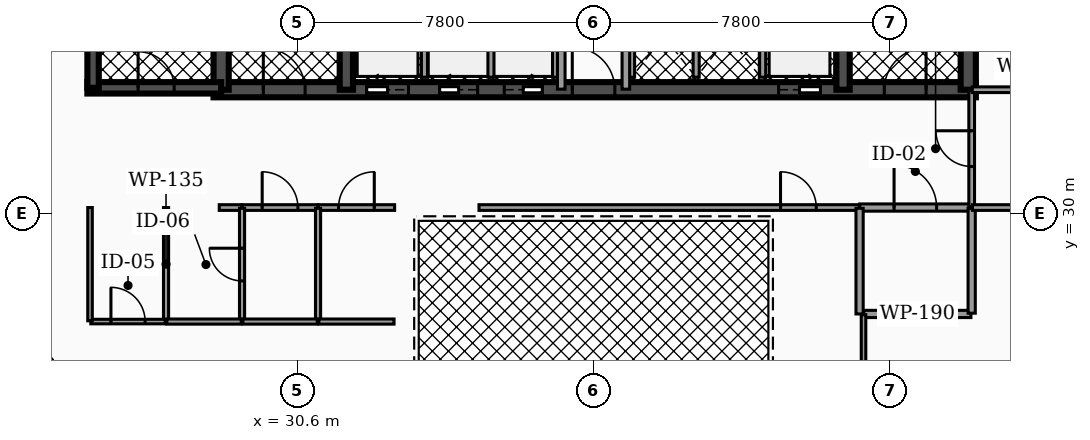
"""IFC4 building model, lengths in metres.
Left out: names, types, materials, properties, quantities, classifications, styles, units other than length and angle.
Written with IfcOpenShell. Run it as: python <this file> out.ifc"""

import sys

from ifc_helpers import new_model, si_unit, direction, frame, frame_2d, origin, place, context, subcontext, project, spatial, rectangle, extrude, element, fill, save


model = new_model("IFC4")
c1 = context("Model", 3, precision=1e-05, world=origin(), true_north=direction((0.0, 1.0)))
c2 = subcontext(c1, "Body", "Model", "MODEL_VIEW")
j1 = project(units=[si_unit("LENGTHUNIT", "METRE"), si_unit("PLANEANGLEUNIT", "RADIAN")], contexts=[c1])
p1 = place(None, origin())
s1 = spatial("IfcSite", under=j1, at=p1, CompositionType="ELEMENT")
p2 = place(p1, origin())
s2 = spatial("IfcBuilding", under=s1, at=p2, CompositionType="ELEMENT")
p3 = place(p2, frame((0.0, 0.0, 160.82)))
s3 = spatial("IfcBuildingStorey", under=s2, at=p3, CompositionType="ELEMENT", Elevation=160.82)
p4 = place(p3, frame((28.4, 33.25, 0.0), z_axis=(0.0, 0.0, 1.0), x_axis=(1.0, 0.0, 0.0)))
e1 = element("IfcWall", 1, at=p4, inside=s3, PredefinedType="SHEAR", context=c2, shape_type="SweptSolid", body=[
    extrude(rectangle(XDim=20.06, YDim=0.4, at=frame_2d((10.03, 0.0))), origin(), (0.0, 0.0, 1.0), 3.5),
])
p5 = place(p4, frame((4.03, 0.0, 0.0)))
e2 = element("IfcOpeningElement", 2, at=p5, cuts=e1, PredefinedType="OPENING", context=c2, shape_type="SweptSolid", body=[
    extrude(rectangle(XDim=1.1, YDim=2.15, at=frame_2d((0.55, 1.075))), frame((0.0, 0.21, 0.0), z_axis=(0.0, -1.0, 0.0), x_axis=(1.0, 0.0, 0.0)), (0.0, 0.0, 1.0), 0.42),
])
p6 = place(p4, frame((14.87, 0.0, 0.0)))
e3 = element("IfcOpeningElement", 3, at=p6, cuts=e1, PredefinedType="OPENING", context=c2, shape_type="SweptSolid", body=[
    extrude(rectangle(XDim=1.1, YDim=2.15, at=frame_2d((0.55, 1.075))), frame((0.0, 0.21, 0.0), z_axis=(0.0, -1.0, 0.0), x_axis=(1.0, 0.0, 0.0)), (0.0, 0.0, 1.0), 0.42),
])
p7 = place(p4, frame((5.95, 0.0, 0.0)))
e4 = element("IfcOpeningElement", 4, at=p7, cuts=e1, PredefinedType="OPENING", context=c2, shape_type="SweptSolid", body=[
    extrude(rectangle(XDim=1.0, YDim=2.1, at=frame_2d((0.5, 1.05))), frame((0.0, 0.21, 0.0), z_axis=(0.0, -1.0, 0.0), x_axis=(1.0, 0.0, 0.0)), (0.0, 0.0, 1.0), 0.42),
])
p8 = place(p4, frame((7.65, 0.0, 0.0)))
e5 = element("IfcOpeningElement", 5, at=p8, cuts=e1, PredefinedType="OPENING", context=c2, shape_type="SweptSolid", body=[
    extrude(rectangle(XDim=1.0, YDim=2.1, at=frame_2d((0.5, 1.05))), frame((0.0, 0.21, 0.0), z_axis=(0.0, -1.0, 0.0), x_axis=(1.0, 0.0, 0.0)), (0.0, 0.0, 1.0), 0.42),
])
p9 = place(p4, frame((1.31, 0.0, 0.0)))
e6 = element("IfcOpeningElement", 6, at=p9, cuts=e1, PredefinedType="OPENING", context=c2, shape_type="SweptSolid", body=[
    extrude(rectangle(XDim=1.1, YDim=2.2, at=frame_2d((0.55, 1.1))), frame((0.0, 0.21, 0.0), z_axis=(0.0, -1.0, 0.0), x_axis=(1.0, 0.0, 0.0)), (0.0, 0.0, 1.0), 0.42),
])
p10 = place(p4, frame((9.44, 0.0, 0.0)))
e7 = element("IfcOpeningElement", 7, at=p10, cuts=e1, PredefinedType="OPENING", context=c2, shape_type="SweptSolid", body=[
    extrude(rectangle(XDim=1.12, YDim=2.05, at=frame_2d((0.56, 1.025))), frame((0.0, 0.21, 0.0), z_axis=(0.0, -1.0, 0.0), x_axis=(1.0, 0.0, 0.0)), (0.0, 0.0, 1.0), 0.42),
])
p11 = place(p4, frame((17.65, 0.0, 0.0)))
e8 = element("IfcOpeningElement", 8, at=p11, cuts=e1, PredefinedType="OPENING", context=c2, shape_type="SweptSolid", body=[
    extrude(rectangle(XDim=1.1, YDim=2.2, at=frame_2d((0.55, 1.1))), frame((0.0, 0.21, 0.0), z_axis=(0.0, -1.0, 0.0), x_axis=(1.0, 0.0, 0.0)), (0.0, 0.0, 1.0), 0.42),
])
p12 = place(p3, frame((28.6, 33.25, 0.0), z_axis=(0.0, 0.0, 1.0), x_axis=(0.0, 1.0, 0.0)))
e9 = element("IfcWall", 9, at=p12, inside=s3, PredefinedType="SHEAR", context=c2, shape_type="SweptSolid", body=[
    extrude(rectangle(XDim=10.2, YDim=0.4, at=frame_2d((5.1, 0.0))), origin(), (0.0, 0.0, 1.0), 3.5),
])
for number, where, z_axis, x_axis in (
    (10, (31.895, 33.25, 0.0), (0.0, 0.0, 1.0), (0.0, 1.0, 0.0)),
    (11, (44.965, 33.25, 0.0), (0.0, 0.0, 1.0), (0.0, 1.0, 0.0)),
):
    element("IfcWall", number, at=place(p3, frame(where, z_axis=z_axis, x_axis=x_axis)), inside=s3, PredefinedType="SHEAR", context=c2, shape_type="SweptSolid", body=[
        extrude(rectangle(XDim=10.2, YDim=0.35, at=frame_2d((5.1, 0.0))), origin(), (0.0, 0.0, 1.0), 3.5),
    ])
p13 = place(p3, frame((48.26, 33.25, 0.0), z_axis=(0.0, 0.0, 1.0), x_axis=(0.0, 1.0, 0.0)))
e12 = element("IfcWall", 12, at=p13, inside=s3, PredefinedType="SHEAR", context=c2, shape_type="SweptSolid", body=[
    extrude(rectangle(XDim=10.2, YDim=0.4, at=frame_2d((5.1, 0.0))), origin(), (0.0, 0.0, 1.0), 3.5),
])
p14 = place(p3, frame((25.08, 33.3, 0.0), z_axis=(0.0, 0.0, 1.0), x_axis=(1.0, 0.0, 0.0)))
e13 = element("IfcWall", 13, at=p14, inside=s3, PredefinedType="SHEAR", context=c2, shape_type="SweptSolid", body=[
    extrude(rectangle(XDim=3.52, YDim=0.3, at=frame_2d((1.76, 0.0))), origin(), (0.0, 0.0, 1.0), 3.5),
])
p15 = place(p14, frame((1.335, 0.0, 0.0)))
e14 = element("IfcOpeningElement", 14, at=p15, cuts=e13, PredefinedType="OPENING", context=c2, shape_type="SweptSolid", body=[
    extrude(rectangle(XDim=0.95, YDim=2.2, at=frame_2d((0.475, 1.1))), frame((0.0, 0.16, 0.0), z_axis=(0.0, -1.0, 0.0), x_axis=(1.0, 0.0, 0.0)), (0.0, 0.0, 1.0), 0.32),
])
p16 = place(p3, frame((25.23, 33.3, 0.0), z_axis=(0.0, 0.0, 1.0), x_axis=(0.0, 1.0, 0.0)))
e15 = element("IfcWall", 15, at=p16, inside=s3, PredefinedType="SHEAR", context=c2, shape_type="SweptSolid", body=[
    extrude(rectangle(XDim=7.6, YDim=0.3, at=frame_2d((3.8, 0.0))), origin(), (0.0, 0.0, 1.0), 3.5),
])
for number, where, z_axis, x_axis in (
    (16, (33.95, 33.58, 0.0), (0.0, 0.0, 1.0), (0.0, 1.0, 0.0)),
    (17, (42.85, 33.58, 0.0), (0.0, 0.0, 1.0), (0.0, 1.0, 0.0)),
):
    element("IfcWall", number, at=place(p3, frame(where, z_axis=z_axis, x_axis=x_axis)), inside=s3, PredefinedType="SOLIDWALL", context=c2, shape_type="SweptSolid", body=[
        extrude(rectangle(XDim=2.45, YDim=0.16, at=frame_2d((1.225, 0.0))), origin(), (0.0, 0.0, 1.0), 2.472),
    ])
for number, where, z_axis, x_axis in (
    (18, (35.7, 33.58, 0.0), (0.0, 0.0, 1.0), (0.0, 1.0, 0.0)),
    (19, (37.4, 33.58, 0.0), (0.0, 0.0, 1.0), (0.0, 1.0, 0.0)),
    (20, (39.4, 33.58, 0.0), (0.0, 0.0, 1.0), (0.0, 1.0, 0.0)),
    (21, (41.1, 33.58, 0.0), (0.0, 0.0, 1.0), (0.0, 1.0, 0.0)),
):
    element("IfcWall", number, at=place(p3, frame(where, z_axis=z_axis, x_axis=x_axis)), inside=s3, PredefinedType="SOLIDWALL", context=c2, shape_type="SweptSolid", body=[
        extrude(rectangle(XDim=2.25, YDim=0.16, at=frame_2d((1.125, 0.0))), origin(), (0.0, 0.0, 1.0), 2.472),
    ])
p17 = place(p3, frame((37.55, 33.265, 0.0), z_axis=(0.0, 0.0, 1.0), x_axis=(0.0, 1.0, 0.0)))
e22 = element("IfcWall", 22, at=p17, inside=s3, PredefinedType="PARTITIONING", context=c2, shape_type="SweptSolid", body=[
    extrude(rectangle(XDim=4.595, YDim=0.2, at=frame_2d((2.298, 0.0))), origin(), (0.0, 0.0, 1.0), 2.457),
])
p18 = place(p17, frame((3.058, 0.0, 0.0)))
e23 = element("IfcOpeningElement", 23, at=p18, cuts=e22, PredefinedType="OPENING", context=c2, shape_type="SweptSolid", body=[
    extrude(rectangle(XDim=0.88, YDim=2.05, at=frame_2d((0.44, 1.025))), frame((0.0, 0.11, 0.0), z_axis=(0.0, -1.0, 0.0), x_axis=(1.0, 0.0, 0.0)), (0.0, 0.0, 1.0), 0.22),
])
p19 = place(p3, frame((39.25, 33.265, 0.0), z_axis=(0.0, 0.0, 1.0), x_axis=(0.0, 1.0, 0.0)))
e24 = element("IfcWall", 24, at=p19, inside=s3, PredefinedType="PARTITIONING", context=c2, shape_type="SweptSolid", body=[
    extrude(rectangle(XDim=4.595, YDim=0.2, at=frame_2d((2.298, 0.0))), origin(), (0.0, 0.0, 1.0), 2.457),
])
p20 = place(p19, frame((3.058, 0.0, 0.0)))
e25 = element("IfcOpeningElement", 25, at=p20, cuts=e24, PredefinedType="OPENING", context=c2, shape_type="SweptSolid", body=[
    extrude(rectangle(XDim=0.88, YDim=2.05, at=frame_2d((0.44, 1.025))), frame((0.0, 0.11, 0.0), z_axis=(0.0, -1.0, 0.0), x_axis=(1.0, 0.0, 0.0)), (0.0, 0.0, 1.0), 0.22),
])
p21 = place(p3, frame((45.405, 30.15, 0.0), z_axis=(0.0, 0.0, 1.0), x_axis=(1.0, 0.0, 0.0)))
e26 = element("IfcWall", 26, at=p21, inside=s3, PredefinedType="PARTITIONING", context=c2, shape_type="SweptSolid", body=[
    extrude(rectangle(XDim=2.925, YDim=0.19, at=frame_2d((1.462, 0.0))), origin(), (0.0, 0.0, 1.0), 2.457),
])
p22 = place(p21, frame((0.903, 0.0, 0.0)))
e27 = element("IfcOpeningElement", 27, at=p22, cuts=e26, PredefinedType="OPENING", context=c2, shape_type="SweptSolid", body=[
    extrude(rectangle(XDim=1.12, YDim=2.05, at=frame_2d((0.56, 1.025))), frame((0.0, 0.105, 0.0), z_axis=(0.0, -1.0, 0.0), x_axis=(1.0, 0.0, 0.0)), (0.0, 0.0, 1.0), 0.21),
])
p23 = place(p3, frame((48.35, 30.17, 0.0), z_axis=(0.0, 0.0, 1.0), x_axis=(0.0, 1.0, 0.0)))
e28 = element("IfcWall", 28, at=p23, inside=s3, PredefinedType="PARTITIONING", context=c2, shape_type="SweptSolid", body=[
    extrude(rectangle(XDim=3.06, YDim=0.15, at=frame_2d((1.53, 0.0))), origin(), (0.0, 0.0, 1.0), 2.457),
])
p24 = place(p23, frame((1.06, 0.0, 0.0)))
e29 = element("IfcOpeningElement", 29, at=p24, cuts=e28, PredefinedType="OPENING", context=c2, shape_type="SweptSolid", body=[
    extrude(rectangle(XDim=0.94, YDim=2.05, at=frame_2d((0.47, 1.025))), frame((0.0, 0.085, 0.0), z_axis=(0.0, -1.0, 0.0), x_axis=(1.0, 0.0, 0.0)), (0.0, 0.0, 1.0), 0.17),
])
p25 = place(p3, frame((28.55, 30.15, 0.0), z_axis=(0.0, 0.0, 1.0), x_axis=(1.0, 0.0, 0.0)))
e30 = element("IfcWall", 30, at=p25, inside=s3, PredefinedType="PARTITIONING", context=c2, shape_type="SweptSolid", body=[
    extrude(rectangle(XDim=0.595, YDim=0.15, at=frame_2d((0.297, 0.0))), origin(), (0.0, 0.0, 1.0), 2.457),
])
p26 = place(p3, frame((29.155, 30.15, 0.0), z_axis=(0.0, 0.0, 1.0), x_axis=(1.0, 0.0, 0.0)))
e31 = element("IfcWall", 31, at=p26, inside=s3, PredefinedType="PARTITIONING", context=c2, shape_type="SweptSolid", body=[
    extrude(rectangle(XDim=1.99, YDim=0.15, at=frame_2d((0.995, 0.0))), origin(), (0.0, 0.0, 1.0), 2.457),
])
p27 = place(p26, frame((0.525, 0.0, 0.0)))
e32 = element("IfcOpeningElement", 32, at=p27, cuts=e31, PredefinedType="OPENING", context=c2, shape_type="SweptSolid", body=[
    extrude(rectangle(XDim=0.94, YDim=2.05, at=frame_2d((0.47, 1.025))), frame((0.0, 0.085, 0.0), z_axis=(0.0, -1.0, 0.0), x_axis=(1.0, 0.0, 0.0)), (0.0, 0.0, 1.0), 0.17),
])
p28 = place(p3, frame((31.155, 30.15, 0.0), z_axis=(0.0, 0.0, 1.0), x_axis=(1.0, 0.0, 0.0)))
e33 = element("IfcWall", 33, at=p28, inside=s3, PredefinedType="PARTITIONING", context=c2, shape_type="SweptSolid", body=[
    extrude(rectangle(XDim=2.01, YDim=0.15, at=frame_2d((1.005, 0.0))), origin(), (0.0, 0.0, 1.0), 2.457),
])
p29 = place(p28, frame((0.535, 0.0, 0.0)))
e34 = element("IfcOpeningElement", 34, at=p29, cuts=e33, PredefinedType="OPENING", context=c2, shape_type="SweptSolid", body=[
    extrude(rectangle(XDim=0.94, YDim=2.05, at=frame_2d((0.47, 1.025))), frame((0.0, 0.085, 0.0), z_axis=(0.0, -1.0, 0.0), x_axis=(1.0, 0.0, 0.0)), (0.0, 0.0, 1.0), 0.17),
])
p30 = place(p3, frame((35.385, 30.15, 0.0), z_axis=(0.0, 0.0, 1.0), x_axis=(1.0, 0.0, 0.0)))
e35 = element("IfcWall", 35, at=p30, inside=s3, PredefinedType="PARTITIONING", context=c2, shape_type="SweptSolid", body=[
    extrude(rectangle(XDim=10.01, YDim=0.15, at=frame_2d((5.005, 0.0))), origin(), (0.0, 0.0, 1.0), 2.457),
])
p31 = place(p30, frame((7.935, 0.0, 0.0)))
e36 = element("IfcOpeningElement", 36, at=p31, cuts=e35, PredefinedType="OPENING", context=c2, shape_type="SweptSolid", body=[
    extrude(rectangle(XDim=0.94, YDim=2.05, at=frame_2d((0.47, 1.025))), frame((0.0, 0.085, 0.0), z_axis=(0.0, -1.0, 0.0), x_axis=(1.0, 0.0, 0.0)), (0.0, 0.0, 1.0), 0.17),
])
p32 = place(p3, frame((45.509, 27.35, 0.0), z_axis=(0.0, 0.0, 1.0), x_axis=(1.0, 0.0, 0.0)))
e37 = element("IfcWall", 37, at=p32, inside=s3, PredefinedType="PARTITIONING", context=c2, shape_type="SweptSolid", body=[
    extrude(rectangle(XDim=2.821, YDim=0.19, at=frame_2d((1.411, 0.0))), origin(), (0.0, 0.0, 1.0), 2.457),
])
p33 = place(p3, frame((48.35, 27.37, 0.0), z_axis=(0.0, 0.0, 1.0), x_axis=(0.0, 1.0, 0.0)))
e38 = element("IfcWall", 38, at=p33, inside=s3, PredefinedType="PARTITIONING", context=c2, shape_type="SweptSolid", body=[
    extrude(rectangle(XDim=2.76, YDim=0.19, at=frame_2d((1.38, 0.0))), origin(), (0.0, 0.0, 1.0), 2.457),
])
p34 = place(p3, frame((45.4, 27.35, 0.0), z_axis=(0.0, 0.0, 1.0), x_axis=(0.0, 1.0, 0.0)))
e39 = element("IfcWall", 39, at=p34, inside=s3, PredefinedType="PARTITIONING", context=c2, shape_type="SweptSolid", body=[
    extrude(rectangle(XDim=2.78, YDim=0.19, at=frame_2d((1.39, 0.0))), origin(), (0.0, 0.0, 1.0), 2.457),
])
p35 = place(p3, frame((48.37, 30.15, 0.0), z_axis=(0.0, 0.0, 1.0), x_axis=(1.0, 0.0, 0.0)))
e40 = element("IfcWall", 40, at=p35, inside=s3, PredefinedType="PARTITIONING", context=c2, shape_type="SweptSolid", body=[
    extrude(rectangle(XDim=3.26, YDim=0.15, at=frame_2d((1.63, 0.0))), origin(), (0.0, 0.0, 1.0), 2.457),
])
p36 = place(p35, frame((1.16, 0.0, 0.0)))
e41 = element("IfcOpeningElement", 41, at=p36, cuts=e40, PredefinedType="OPENING", context=c2, shape_type="SweptSolid", body=[
    extrude(rectangle(XDim=0.94, YDim=2.05, at=frame_2d((0.47, 1.025))), frame((0.0, 0.085, 0.0), z_axis=(0.0, -1.0, 0.0), x_axis=(1.0, 0.0, 0.0)), (0.0, 0.0, 1.0), 0.17),
])
p37 = place(p3, frame((48.365, 33.25, 0.0), z_axis=(0.0, 0.0, 1.0), x_axis=(1.0, 0.0, 0.0)))
e42 = element("IfcWall", 42, at=p37, inside=s3, PredefinedType="PARTITIONING", context=c2, shape_type="SweptSolid", body=[
    extrude(rectangle(XDim=3.265, YDim=0.15, at=frame_2d((1.632, 0.0))), origin(), (0.0, 0.0, 1.0), 2.457),
])
p38 = place(p3, frame((27.15, 27.17, 0.0), z_axis=(0.0, 0.0, 1.0), x_axis=(0.0, 1.0, 0.0)))
e43 = element("IfcWall", 43, at=p38, inside=s3, PredefinedType="PARTITIONING", context=c2, shape_type="SweptSolid", body=[
    extrude(rectangle(XDim=2.98, YDim=0.135, at=frame_2d((1.49, 0.0))), origin(), (0.0, 0.0, 1.0), 2.457),
])
p39 = place(p3, frame((25.17, 27.15, 0.0), z_axis=(0.0, 0.0, 1.0), x_axis=(1.0, 0.0, 0.0)))
e44 = element("IfcWall", 44, at=p39, inside=s3, PredefinedType="PARTITIONING", context=c2, shape_type="SweptSolid", body=[
    extrude(rectangle(XDim=1.96, YDim=0.12, at=frame_2d((0.98, 0.0))), origin(), (0.0, 0.0, 1.0), 2.457),
])
p40 = place(p39, frame((0.53, 0.0, 0.0)))
e45 = element("IfcOpeningElement", 45, at=p40, cuts=e44, PredefinedType="OPENING", context=c2, shape_type="SweptSolid", body=[
    extrude(rectangle(XDim=0.9, YDim=2.05, at=frame_2d((0.45, 1.025))), frame((0.0, 0.07, 0.0), z_axis=(0.0, -1.0, 0.0), x_axis=(1.0, 0.0, 0.0)), (0.0, 0.0, 1.0), 0.14),
])
p41 = place(p3, frame((25.15, 27.17, 0.0), z_axis=(0.0, 0.0, 1.0), x_axis=(0.0, 1.0, 0.0)))
e46 = element("IfcWall", 46, at=p41, inside=s3, PredefinedType="PARTITIONING", context=c2, shape_type="SweptSolid", body=[
    extrude(rectangle(XDim=2.98, YDim=0.12, at=frame_2d((1.49, 0.0))), origin(), (0.0, 0.0, 1.0), 2.457),
])
p42 = place(p3, frame((29.15, 27.17, 0.0), z_axis=(0.0, 0.0, 1.0), x_axis=(0.0, 1.0, 0.0)))
e47 = element("IfcWall", 47, at=p42, inside=s3, PredefinedType="PARTITIONING", context=c2, shape_type="SweptSolid", body=[
    extrude(rectangle(XDim=2.96, YDim=0.135, at=frame_2d((1.48, 0.0))), origin(), (0.0, 0.0, 1.0), 2.457),
])
p43 = place(p42, frame((1.05, 0.0, 0.0)))
e48 = element("IfcOpeningElement", 48, at=p43, cuts=e47, PredefinedType="OPENING", context=c2, shape_type="SweptSolid", body=[
    extrude(rectangle(XDim=0.86, YDim=2.05, at=frame_2d((0.43, 1.025))), frame((0.0, 0.077, 0.0), z_axis=(0.0, -1.0, 0.0), x_axis=(1.0, 0.0, 0.0)), (0.0, 0.0, 1.0), 0.155),
])
p44 = place(p3, frame((27.17, 27.15, 0.0), z_axis=(0.0, 0.0, 1.0), x_axis=(1.0, 0.0, 0.0)))
e49 = element("IfcWall", 49, at=p44, inside=s3, PredefinedType="PARTITIONING", context=c2, shape_type="SweptSolid", body=[
    extrude(rectangle(XDim=1.96, YDim=0.135, at=frame_2d((0.98, 0.0))), origin(), (0.0, 0.0, 1.0), 2.457),
])
p45 = place(p3, frame((31.15, 27.17, 0.0), z_axis=(0.0, 0.0, 1.0), x_axis=(0.0, 1.0, 0.0)))
e50 = element("IfcWall", 50, at=p45, inside=s3, PredefinedType="PARTITIONING", context=c2, shape_type="SweptSolid", body=[
    extrude(rectangle(XDim=2.96, YDim=0.135, at=frame_2d((1.48, 0.0))), origin(), (0.0, 0.0, 1.0), 2.457),
])
p46 = place(p3, frame((29.17, 27.15, 0.0), z_axis=(0.0, 0.0, 1.0), x_axis=(1.0, 0.0, 0.0)))
e51 = element("IfcWall", 51, at=p46, inside=s3, PredefinedType="PARTITIONING", context=c2, shape_type="SweptSolid", body=[
    extrude(rectangle(XDim=1.96, YDim=0.135, at=frame_2d((0.98, 0.0))), origin(), (0.0, 0.0, 1.0), 2.457),
])
p47 = place(p3, frame((31.17, 27.15, 0.0), z_axis=(0.0, 0.0, 1.0), x_axis=(1.0, 0.0, 0.0)))
e52 = element("IfcWall", 52, at=p47, inside=s3, PredefinedType="PARTITIONING", context=c2, shape_type="SweptSolid", body=[
    extrude(rectangle(XDim=1.98, YDim=0.135, at=frame_2d((0.99, 0.0))), origin(), (0.0, 0.0, 1.0), 2.457),
])
p48 = place(p3, frame((45.504, 17.738, 0.0), z_axis=(0.0, 0.0, 1.0), x_axis=(0.0, 1.0, 0.0)))
e53 = element("IfcWall", 53, at=p48, inside=s3, PredefinedType="PARTITIONING", context=c2, shape_type="SweptSolid", body=[
    extrude(rectangle(XDim=9.592, YDim=0.12, at=frame_2d((4.796, 0.0))), origin(), (0.0, 0.0, 1.0), 2.457),
])
p49 = place(p5, origin())
e54 = element("IfcDoor", 54, at=p49, inside=s3, OperationType="SLIDING_TO_LEFT", PredefinedType="DOOR", context=c2, shape_type="SweptSolid", body=[
    extrude(rectangle(XDim=1.1, YDim=2.15, at=frame_2d((0.55, 1.075))), frame((0.0, 0.025, 0.0), z_axis=(0.0, -1.0, 0.0), x_axis=(1.0, 0.0, 0.0)), (0.0, 0.0, 1.0), 0.05),
])
fill(e2, e54)
p50 = place(p6, origin())
e55 = element("IfcDoor", 55, at=p50, inside=s3, OperationType="SLIDING_TO_RIGHT", PredefinedType="DOOR", context=c2, shape_type="SweptSolid", body=[
    extrude(rectangle(XDim=1.1, YDim=2.15, at=frame_2d((0.55, 1.075))), frame((0.0, 0.025, 0.0), z_axis=(0.0, -1.0, 0.0), x_axis=(1.0, 0.0, 0.0)), (0.0, 0.0, 1.0), 0.05),
])
fill(e3, e55)
p51 = place(p7, origin())
e56 = element("IfcDoor", 56, at=p51, inside=s3, OperationType="SLIDING_TO_LEFT", PredefinedType="DOOR", context=c2, shape_type="SweptSolid", body=[
    extrude(rectangle(XDim=1.0, YDim=2.1, at=frame_2d((0.5, 1.05))), frame((0.0, 0.025, 0.0), z_axis=(0.0, -1.0, 0.0), x_axis=(1.0, 0.0, 0.0)), (0.0, 0.0, 1.0), 0.05),
])
fill(e4, e56)
p52 = place(p8, origin())
e57 = element("IfcDoor", 57, at=p52, inside=s3, OperationType="SLIDING_TO_RIGHT", PredefinedType="DOOR", context=c2, shape_type="SweptSolid", body=[
    extrude(rectangle(XDim=1.0, YDim=2.1, at=frame_2d((0.5, 1.05))), frame((0.0, 0.025, 0.0), z_axis=(0.0, -1.0, 0.0), x_axis=(1.0, 0.0, 0.0)), (0.0, 0.0, 1.0), 0.05),
])
fill(e5, e57)
p53 = place(p9, origin())
e58 = element("IfcDoor", 58, at=p53, inside=s3, OperationType="SINGLE_SWING_LEFT", PredefinedType="DOOR", context=c2, shape_type="SweptSolid", body=[
    extrude(rectangle(XDim=1.1, YDim=2.2, at=frame_2d((0.55, 1.1))), frame((0.0, 0.025, 0.0), z_axis=(0.0, -1.0, 0.0), x_axis=(1.0, 0.0, 0.0)), (0.0, 0.0, 1.0), 0.05),
])
fill(e6, e58)
p54 = place(p10, origin())
e59 = element("IfcDoor", 59, at=p54, inside=s3, OperationType="SINGLE_SWING_LEFT", PredefinedType="DOOR", context=c2, shape_type="SweptSolid", body=[
    extrude(rectangle(XDim=1.12, YDim=2.05, at=frame_2d((0.56, 1.025))), frame((0.0, 0.025, 0.0), z_axis=(0.0, -1.0, 0.0), x_axis=(1.0, 0.0, 0.0)), (0.0, 0.0, 1.0), 0.05),
])
fill(e7, e59)
p55 = place(p11, origin())
e60 = element("IfcDoor", 60, at=p55, inside=s3, OperationType="SINGLE_SWING_RIGHT", PredefinedType="DOOR", context=c2, shape_type="SweptSolid", body=[
    extrude(rectangle(XDim=1.1, YDim=2.2, at=frame_2d((0.55, 1.1))), frame((0.0, 0.025, 0.0), z_axis=(0.0, -1.0, 0.0), x_axis=(1.0, 0.0, 0.0)), (0.0, 0.0, 1.0), 0.05),
])
fill(e8, e60)
p56 = place(p15, origin())
e61 = element("IfcDoor", 61, at=p56, inside=s3, OperationType="SINGLE_SWING_LEFT", PredefinedType="DOOR", context=c2, shape_type="SweptSolid", body=[
    extrude(rectangle(XDim=0.95, YDim=2.2, at=frame_2d((0.475, 1.1))), frame((0.0, 0.025, 0.0), z_axis=(0.0, -1.0, 0.0), x_axis=(1.0, 0.0, 0.0)), (0.0, 0.0, 1.0), 0.05),
])
fill(e14, e61)
p57 = place(p22, origin())
e62 = element("IfcDoor", 62, at=p57, inside=s3, OperationType="SINGLE_SWING_LEFT", PredefinedType="DOOR", context=c2, shape_type="SweptSolid", body=[
    extrude(rectangle(XDim=1.12, YDim=2.05, at=frame_2d((0.56, 1.025))), frame((0.0, 0.025, 0.0), z_axis=(0.0, -1.0, 0.0), x_axis=(1.0, 0.0, 0.0)), (0.0, 0.0, 1.0), 0.05),
])
fill(e27, e62)
p58 = place(p24, origin())
e63 = element("IfcDoor", 63, at=p58, inside=s3, OperationType="SINGLE_SWING_RIGHT", PredefinedType="DOOR", context=c2, shape_type="SweptSolid", body=[
    extrude(rectangle(XDim=0.94, YDim=2.05, at=frame_2d((0.47, 1.025))), frame((0.0, 0.025, 0.0), z_axis=(0.0, -1.0, 0.0), x_axis=(1.0, 0.0, 0.0)), (0.0, 0.0, 1.0), 0.05),
])
fill(e29, e63)
p59 = place(p27, origin())
e64 = element("IfcDoor", 64, at=p59, inside=s3, OperationType="SINGLE_SWING_LEFT", PredefinedType="DOOR", context=c2, shape_type="SweptSolid", body=[
    extrude(rectangle(XDim=0.94, YDim=2.05, at=frame_2d((0.47, 1.025))), frame((0.0, 0.025, 0.0), z_axis=(0.0, -1.0, 0.0), x_axis=(1.0, 0.0, 0.0)), (0.0, 0.0, 1.0), 0.05),
])
fill(e32, e64)
p60 = place(p29, origin())
e65 = element("IfcDoor", 65, at=p60, inside=s3, OperationType="SINGLE_SWING_RIGHT", PredefinedType="DOOR", context=c2, shape_type="SweptSolid", body=[
    extrude(rectangle(XDim=0.94, YDim=2.05, at=frame_2d((0.47, 1.025))), frame((0.0, 0.025, 0.0), z_axis=(0.0, -1.0, 0.0), x_axis=(1.0, 0.0, 0.0)), (0.0, 0.0, 1.0), 0.05),
])
fill(e34, e65)
p61 = place(p31, origin())
e66 = element("IfcDoor", 66, at=p61, inside=s3, OperationType="SINGLE_SWING_LEFT", PredefinedType="DOOR", context=c2, shape_type="SweptSolid", body=[
    extrude(rectangle(XDim=0.94, YDim=2.05, at=frame_2d((0.47, 1.025))), frame((0.0, 0.025, 0.0), z_axis=(0.0, -1.0, 0.0), x_axis=(1.0, 0.0, 0.0)), (0.0, 0.0, 1.0), 0.05),
])
fill(e36, e66)
p62 = place(p40, origin())
e67 = element("IfcDoor", 67, at=p62, inside=s3, OperationType="SINGLE_SWING_LEFT", PredefinedType="DOOR", context=c2, shape_type="SweptSolid", body=[
    extrude(rectangle(XDim=0.9, YDim=2.05, at=frame_2d((0.45, 1.025))), frame((0.0, 0.025, 0.0), z_axis=(0.0, -1.0, 0.0), x_axis=(1.0, 0.0, 0.0)), (0.0, 0.0, 1.0), 0.05),
])
fill(e45, e67)
p63 = place(p43, origin())
e68 = element("IfcDoor", 68, at=p63, inside=s3, OperationType="SINGLE_SWING_RIGHT", PredefinedType="DOOR", context=c2, shape_type="SweptSolid", body=[
    extrude(rectangle(XDim=0.86, YDim=2.05, at=frame_2d((0.43, 1.025))), frame((0.0, 0.025, 0.0), z_axis=(0.0, -1.0, 0.0), x_axis=(1.0, 0.0, 0.0)), (0.0, 0.0, 1.0), 0.05),
])
fill(e48, e68)
save(model, sys.argv[1])
